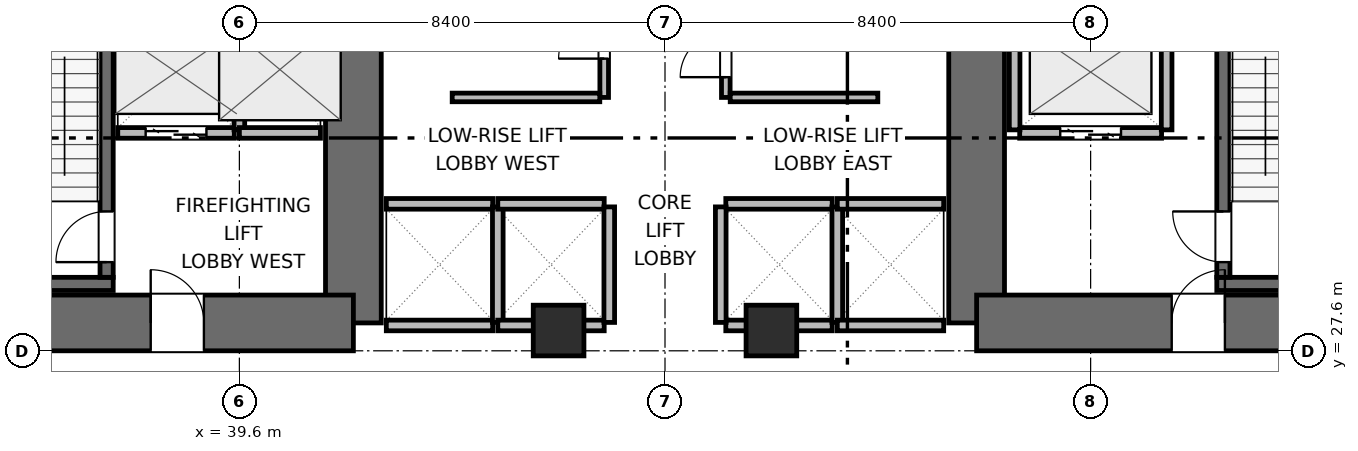
"""IFC4 building model, lengths in metres.
Left out: names, types, materials, properties, quantities, classifications, styles, units other than length and angle.
Written with IfcOpenShell. Run it as: python <this file> out.ifc"""

import sys

from ifc_helpers import new_model, si_unit, direction, frame, frame_2d, origin, origin_2d, place, context, subcontext, project, spatial, rectangle, extrude, element, fill, save


model = new_model("IFC4")
c1 = context("Model", 3, precision=1e-05, world=origin(), true_north=direction((0.0, 1.0)))
c2 = subcontext(c1, "Body", "Model", "MODEL_VIEW")
j1 = project(units=[si_unit("LENGTHUNIT", "METRE"), si_unit("PLANEANGLEUNIT", "RADIAN")], contexts=[c1])
p1 = place(None, origin())
s1 = spatial("IfcSite", under=j1, at=p1, CompositionType="ELEMENT")
p2 = place(p1, origin())
s2 = spatial("IfcBuilding", under=s1, at=p2, CompositionType="ELEMENT")
p3 = place(p2, frame((0.0, 0.0, 17.1)))
s3 = spatial("IfcBuildingStorey", under=s2, at=p3, CompositionType="ELEMENT", Elevation=17.1)
p4 = place(p3, frame((41.85, 28.15, 0.0), z_axis=(0.0, 0.0, 1.0), x_axis=(0.0, 1.0, 0.0)))
e1 = element("IfcWall", 1, at=p4, inside=s3, PredefinedType="SHEAR", context=c2, shape_type="SweptSolid", body=[
    extrude(rectangle(XDim=6.25, YDim=1.1, at=frame_2d((3.125, 0.0))), origin(), (0.0, 0.0, 1.0), 4.5),
])
p5 = place(p3, frame((32.95, 28.15, 0.0), z_axis=(0.0, 0.0, 1.0), x_axis=(1.0, 0.0, 0.0)))
e2 = element("IfcWall", 2, at=p5, inside=s3, PredefinedType="SHEAR", context=c2, shape_type="SweptSolid", body=[
    extrude(rectangle(XDim=8.9, YDim=1.1, at=frame_2d((4.45, 0.0))), origin(), (0.0, 0.0, 1.0), 4.5),
])
p6 = place(p5, frame((4.9, 0.0, 0.0)))
e3 = element("IfcOpeningElement", 3, at=p6, cuts=e2, PredefinedType="OPENING", context=c2, shape_type="SweptSolid", body=[
    extrude(rectangle(XDim=1.05, YDim=2.04, at=frame_2d((0.525, 1.02))), frame((0.0, 0.56, 0.0), z_axis=(0.0, -1.0, 0.0), x_axis=(1.0, 0.0, 0.0)), (0.0, 0.0, 1.0), 1.12),
])
p7 = place(p3, frame((54.15, 28.15, 0.0), z_axis=(0.0, 0.0, 1.0), x_axis=(0.0, 1.0, 0.0)))
e4 = element("IfcWall", 4, at=p7, inside=s3, PredefinedType="SHEAR", context=c2, shape_type="SweptSolid", body=[
    extrude(rectangle(XDim=7.65, YDim=1.1, at=frame_2d((3.825, 0.0))), origin(), (0.0, 0.0, 1.0), 4.5),
])
p8 = place(p3, frame((54.15, 28.15, 0.0), z_axis=(0.0, 0.0, 1.0), x_axis=(1.0, 0.0, 0.0)))
e5 = element("IfcWall", 5, at=p8, inside=s3, PredefinedType="SHEAR", context=c2, shape_type="SweptSolid", body=[
    extrude(rectangle(XDim=8.9, YDim=1.1, at=frame_2d((4.45, 0.0))), origin(), (0.0, 0.0, 1.0), 4.5),
])
p9 = place(p8, frame((3.85, 0.0, 0.0)))
e6 = element("IfcOpeningElement", 6, at=p9, cuts=e5, PredefinedType="OPENING", context=c2, shape_type="SweptSolid", body=[
    extrude(rectangle(XDim=1.05, YDim=2.04, at=frame_2d((0.525, 1.02))), frame((0.0, 0.56, 0.0), z_axis=(0.0, -1.0, 0.0), x_axis=(1.0, 0.0, 0.0)), (0.0, 0.0, 1.0), 1.12),
])
p10 = place(p3, frame((33.5, 28.92, 0.0), z_axis=(0.0, 0.0, 1.0), x_axis=(1.0, 0.0, 0.0)))
e7 = element("IfcWall", 7, at=p10, inside=s3, PredefinedType="SHEAR", context=c2, shape_type="SweptSolid", body=[
    extrude(rectangle(XDim=3.61, YDim=0.26, at=frame_2d((1.805, 0.0))), origin(), (0.0, 0.0, 1.0), 4.5),
])
p11 = place(p3, frame((36.98, 29.05, 0.0), z_axis=(0.0, 0.0, 1.0), x_axis=(0.0, 1.0, 0.0)))
e8 = element("IfcWall", 8, at=p11, inside=s3, PredefinedType="SHEAR", context=c2, shape_type="SweptSolid", body=[
    extrude(rectangle(XDim=7.6, YDim=0.26, at=frame_2d((3.8, 0.0))), origin(), (0.0, 0.0, 1.0), 4.5),
])
p12 = place(p11, frame((0.3, 0.0, 0.0)))
e9 = element("IfcOpeningElement", 9, at=p12, cuts=e8, PredefinedType="OPENING", context=c2, shape_type="SweptSolid", body=[
    extrude(rectangle(XDim=1.0, YDim=2.04, at=frame_2d((0.5, 1.02))), frame((0.0, 0.14, 0.0), z_axis=(0.0, -1.0, 0.0), x_axis=(1.0, 0.0, 0.0)), (0.0, 0.0, 1.0), 0.28),
])
p13 = place(p3, frame((58.89, 28.92, 0.0), z_axis=(0.0, 0.0, 1.0), x_axis=(1.0, 0.0, 0.0)))
e10 = element("IfcWall", 10, at=p13, inside=s3, PredefinedType="SHEAR", context=c2, shape_type="SweptSolid", body=[
    extrude(rectangle(XDim=3.61, YDim=0.26, at=frame_2d((1.805, 0.0))), origin(), (0.0, 0.0, 1.0), 4.5),
])
p14 = place(p3, frame((59.02, 29.05, 0.0), z_axis=(0.0, 0.0, 1.0), x_axis=(0.0, 1.0, 0.0)))
e11 = element("IfcWall", 11, at=p14, inside=s3, PredefinedType="SHEAR", context=c2, shape_type="SweptSolid", body=[
    extrude(rectangle(XDim=7.6, YDim=0.26, at=frame_2d((3.8, 0.0))), origin(), (0.0, 0.0, 1.0), 4.5),
])
p15 = place(p14, frame((0.3, 0.0, 0.0)))
e12 = element("IfcOpeningElement", 12, at=p15, cuts=e11, PredefinedType="OPENING", context=c2, shape_type="SweptSolid", body=[
    extrude(rectangle(XDim=1.0, YDim=2.04, at=frame_2d((0.5, 1.02))), frame((0.0, 0.14, 0.0), z_axis=(0.0, -1.0, 0.0), x_axis=(1.0, 0.0, 0.0)), (0.0, 0.0, 1.0), 0.28),
])
for number, where, z_axis, x_axis in (
    (13, (45.9, 28.0, 0.0), (0.0, 0.0, 1.0), (1.0, 0.0, 0.0)),
    (14, (50.1, 28.0, 0.0), (0.0, 0.0, 1.0), (1.0, 0.0, 0.0)),
):
    element("IfcColumn", number, at=place(p3, frame(where, z_axis=z_axis, x_axis=x_axis)), inside=s3, PredefinedType="COLUMN", context=c2, shape_type="SweptSolid", body=[
        extrude(rectangle(XDim=1.0, YDim=1.0, at=origin_2d()), origin(), (0.0, 0.0, 1.0), 4.5),
    ])
p16 = place(p3, frame((37.2, 31.9, 0.0), z_axis=(0.0, 0.0, 1.0), x_axis=(1.0, 0.0, 0.0)))
e15 = element("IfcWall", 15, at=p16, inside=s3, PredefinedType="PARTITIONING", context=c2, shape_type="SweptSolid", body=[
    extrude(rectangle(XDim=2.3, YDim=0.21, at=frame_2d((1.15, 0.0))), origin(), (0.0, 0.0, 1.0), 4.24),
])
p17 = place(p16, frame((0.55, 0.0, 0.0)))
e16 = element("IfcOpeningElement", 16, at=p17, cuts=e15, PredefinedType="OPENING", context=c2, shape_type="SweptSolid", body=[
    extrude(rectangle(XDim=1.2, YDim=2.04, at=frame_2d((0.6, 1.02))), frame((0.0, 0.115, 0.0), z_axis=(0.0, -1.0, 0.0), x_axis=(1.0, 0.0, 0.0)), (0.0, 0.0, 1.0), 0.23),
])
p18 = place(p3, frame((39.6, 31.96, 0.0), z_axis=(0.0, 0.0, 1.0), x_axis=(0.0, 1.0, 0.0)))
e17 = element("IfcWall", 17, at=p18, inside=s3, PredefinedType="PARTITIONING", context=c2, shape_type="SweptSolid", body=[
    extrude(rectangle(XDim=2.28, YDim=0.21, at=frame_2d((1.14, 0.0))), origin(), (0.0, 0.0, 1.0), 4.24),
])
p19 = place(p3, frame((55.0, 31.9, 0.0), z_axis=(0.0, 0.0, 1.0), x_axis=(1.0, 0.0, 0.0)))
e18 = element("IfcWall", 18, at=p19, inside=s3, PredefinedType="PARTITIONING", context=c2, shape_type="SweptSolid", body=[
    extrude(rectangle(XDim=2.8, YDim=0.21, at=frame_2d((1.4, 0.0))), origin(), (0.0, 0.0, 1.0), 4.24),
])
p20 = place(p19, frame((0.8, 0.0, 0.0)))
e19 = element("IfcOpeningElement", 19, at=p20, cuts=e18, PredefinedType="OPENING", context=c2, shape_type="SweptSolid", body=[
    extrude(rectangle(XDim=1.2, YDim=2.04, at=frame_2d((0.6, 1.02))), frame((0.0, 0.115, 0.0), z_axis=(0.0, -1.0, 0.0), x_axis=(1.0, 0.0, 0.0)), (0.0, 0.0, 1.0), 0.23),
])
for number, where, z_axis, x_axis in (
    (20, (54.9, 31.96, 0.0), (0.0, 0.0, 1.0), (0.0, 1.0, 0.0)),
    (21, (57.9, 31.96, 0.0), (0.0, 0.0, 1.0), (0.0, 1.0, 0.0)),
):
    element("IfcWall", number, at=place(p3, frame(where, z_axis=z_axis, x_axis=x_axis)), inside=s3, PredefinedType="PARTITIONING", context=c2, shape_type="SweptSolid", body=[
        extrude(rectangle(XDim=2.28, YDim=0.21, at=frame_2d((1.14, 0.0))), origin(), (0.0, 0.0, 1.0), 4.24),
    ])
p21 = place(p3, frame((39.6, 31.9, 0.0), z_axis=(0.0, 0.0, 1.0), x_axis=(1.0, 0.0, 0.0)))
e22 = element("IfcWall", 22, at=p21, inside=s3, PredefinedType="PARTITIONING", context=c2, shape_type="SweptSolid", body=[
    extrude(rectangle(XDim=1.6, YDim=0.21, at=frame_2d((0.8, 0.0))), origin(), (0.0, 0.0, 1.0), 4.24),
])
p22 = place(p3, frame((42.5, 30.5, 0.0), z_axis=(0.0, 0.0, 1.0), x_axis=(1.0, 0.0, 0.0)))
e23 = element("IfcWall", 23, at=p22, inside=s3, PredefinedType="PARTITIONING", context=c2, shape_type="SweptSolid", body=[
    extrude(rectangle(XDim=2.1, YDim=0.21, at=frame_2d((1.05, 0.0))), origin(), (0.0, 0.0, 1.0), 4.24),
])
p23 = place(p3, frame((42.5, 28.1, 0.0), z_axis=(0.0, 0.0, 1.0), x_axis=(1.0, 0.0, 0.0)))
e24 = element("IfcWall", 24, at=p23, inside=s3, PredefinedType="PARTITIONING", context=c2, shape_type="SweptSolid", body=[
    extrude(rectangle(XDim=2.1, YDim=0.21, at=frame_2d((1.05, 0.0))), origin(), (0.0, 0.0, 1.0), 3.125),
])
p24 = place(p3, frame((44.7, 28.16, 0.0), z_axis=(0.0, 0.0, 1.0), x_axis=(0.0, 1.0, 0.0)))
e25 = element("IfcWall", 25, at=p24, inside=s3, PredefinedType="PARTITIONING", context=c2, shape_type="SweptSolid", body=[
    extrude(rectangle(XDim=2.28, YDim=0.21, at=frame_2d((1.14, 0.0))), origin(), (0.0, 0.0, 1.0), 4.24),
])
p25 = place(p3, frame((44.7, 30.5, 0.0), z_axis=(0.0, 0.0, 1.0), x_axis=(1.0, 0.0, 0.0)))
e26 = element("IfcWall", 26, at=p25, inside=s3, PredefinedType="PARTITIONING", context=c2, shape_type="SweptSolid", body=[
    extrude(rectangle(XDim=2.1, YDim=0.21, at=frame_2d((1.05, 0.0))), origin(), (0.0, 0.0, 1.0), 4.24),
])
p26 = place(p3, frame((44.7, 28.1, 0.0), z_axis=(0.0, 0.0, 1.0), x_axis=(1.0, 0.0, 0.0)))
e27 = element("IfcWall", 27, at=p26, inside=s3, PredefinedType="PARTITIONING", context=c2, shape_type="SweptSolid", body=[
    extrude(rectangle(XDim=2.1, YDim=0.21, at=frame_2d((1.05, 0.0))), origin(), (0.0, 0.0, 1.0), 3.125),
])
p27 = place(p3, frame((46.9, 28.16, 0.0), z_axis=(0.0, 0.0, 1.0), x_axis=(0.0, 1.0, 0.0)))
e28 = element("IfcWall", 28, at=p27, inside=s3, PredefinedType="PARTITIONING", context=c2, shape_type="SweptSolid", body=[
    extrude(rectangle(XDim=2.28, YDim=0.21, at=frame_2d((1.14, 0.0))), origin(), (0.0, 0.0, 1.0), 4.24),
])
p28 = place(p3, frame((49.2, 30.5, 0.0), z_axis=(0.0, 0.0, 1.0), x_axis=(1.0, 0.0, 0.0)))
e29 = element("IfcWall", 29, at=p28, inside=s3, PredefinedType="PARTITIONING", context=c2, shape_type="SweptSolid", body=[
    extrude(rectangle(XDim=2.1, YDim=0.21, at=frame_2d((1.05, 0.0))), origin(), (0.0, 0.0, 1.0), 4.24),
])
p29 = place(p3, frame((49.2, 28.1, 0.0), z_axis=(0.0, 0.0, 1.0), x_axis=(1.0, 0.0, 0.0)))
e30 = element("IfcWall", 30, at=p29, inside=s3, PredefinedType="PARTITIONING", context=c2, shape_type="SweptSolid", body=[
    extrude(rectangle(XDim=2.1, YDim=0.21, at=frame_2d((1.05, 0.0))), origin(), (0.0, 0.0, 1.0), 3.125),
])
for number, where, z_axis, x_axis in (
    (31, (49.1, 28.16, 0.0), (0.0, 0.0, 1.0), (0.0, 1.0, 0.0)),
    (32, (51.4, 28.16, 0.0), (0.0, 0.0, 1.0), (0.0, 1.0, 0.0)),
):
    element("IfcWall", number, at=place(p3, frame(where, z_axis=z_axis, x_axis=x_axis)), inside=s3, PredefinedType="PARTITIONING", context=c2, shape_type="SweptSolid", body=[
        extrude(rectangle(XDim=2.28, YDim=0.21, at=frame_2d((1.14, 0.0))), origin(), (0.0, 0.0, 1.0), 4.24),
    ])
p30 = place(p3, frame((51.4, 30.5, 0.0), z_axis=(0.0, 0.0, 1.0), x_axis=(1.0, 0.0, 0.0)))
e33 = element("IfcWall", 33, at=p30, inside=s3, PredefinedType="PARTITIONING", context=c2, shape_type="SweptSolid", body=[
    extrude(rectangle(XDim=2.1, YDim=0.21, at=frame_2d((1.05, 0.0))), origin(), (0.0, 0.0, 1.0), 4.24),
])
p31 = place(p3, frame((51.4, 28.1, 0.0), z_axis=(0.0, 0.0, 1.0), x_axis=(1.0, 0.0, 0.0)))
e34 = element("IfcWall", 34, at=p31, inside=s3, PredefinedType="PARTITIONING", context=c2, shape_type="SweptSolid", body=[
    extrude(rectangle(XDim=2.1, YDim=0.21, at=frame_2d((1.05, 0.0))), origin(), (0.0, 0.0, 1.0), 3.125),
])
p32 = place(p3, frame((46.8, 32.6, 0.0), z_axis=(0.0, 0.0, 1.0), x_axis=(0.0, 1.0, 0.0)))
e35 = element("IfcWall", 35, at=p32, inside=s3, PredefinedType="PARTITIONING", context=c2, shape_type="SweptSolid", body=[
    extrude(rectangle(XDim=3.8, YDim=0.17, at=frame_2d((1.9, 0.0))), origin(), (0.0, 0.0, 1.0), 4.24),
])
p33 = place(p32, frame((0.766, 0.0, 0.0)))
e36 = element("IfcOpeningElement", 36, at=p33, cuts=e35, PredefinedType="OPENING", context=c2, shape_type="SweptSolid", body=[
    extrude(rectangle(XDim=0.9, YDim=2.02, at=frame_2d((0.45, 1.01))), frame((0.0, 0.095, 0.0), z_axis=(0.0, -1.0, 0.0), x_axis=(1.0, 0.0, 0.0)), (0.0, 0.0, 1.0), 0.19),
])
p34 = place(p32, frame((2.666, 0.0, 0.0)))
e37 = element("IfcOpeningElement", 37, at=p34, cuts=e35, PredefinedType="OPENING", context=c2, shape_type="SweptSolid", body=[
    extrude(rectangle(XDim=0.9, YDim=2.02, at=frame_2d((0.45, 1.01))), frame((0.0, 0.095, 0.0), z_axis=(0.0, -1.0, 0.0), x_axis=(1.0, 0.0, 0.0)), (0.0, 0.0, 1.0), 0.19),
])
p35 = place(p3, frame((43.8, 32.6, 0.0), z_axis=(0.0, 0.0, 1.0), x_axis=(1.0, 0.0, 0.0)))
e38 = element("IfcWall", 38, at=p35, inside=s3, PredefinedType="PARTITIONING", context=c2, shape_type="SweptSolid", body=[
    extrude(rectangle(XDim=2.913, YDim=0.17, at=frame_2d((1.457, 0.0))), origin(), (0.0, 0.0, 1.0), 4.24),
])
p36 = place(p3, frame((49.2, 32.6, 0.0), z_axis=(0.0, 0.0, 1.0), x_axis=(0.0, 1.0, 0.0)))
e39 = element("IfcWall", 39, at=p36, inside=s3, PredefinedType="PARTITIONING", context=c2, shape_type="SweptSolid", body=[
    extrude(rectangle(XDim=3.4, YDim=0.17, at=frame_2d((1.7, 0.0))), origin(), (0.0, 0.0, 1.0), 4.24),
])
p37 = place(p36, frame((0.4, 0.0, 0.0)))
e40 = element("IfcOpeningElement", 40, at=p37, cuts=e39, PredefinedType="OPENING", context=c2, shape_type="SweptSolid", body=[
    extrude(rectangle(XDim=0.9, YDim=2.02, at=frame_2d((0.45, 1.01))), frame((0.0, 0.095, 0.0), z_axis=(0.0, -1.0, 0.0), x_axis=(1.0, 0.0, 0.0)), (0.0, 0.0, 1.0), 0.19),
])
p38 = place(p36, frame((2.1, 0.0, 0.0)))
e41 = element("IfcOpeningElement", 41, at=p38, cuts=e39, PredefinedType="OPENING", context=c2, shape_type="SweptSolid", body=[
    extrude(rectangle(XDim=0.9, YDim=2.02, at=frame_2d((0.45, 1.01))), frame((0.0, 0.095, 0.0), z_axis=(0.0, -1.0, 0.0), x_axis=(1.0, 0.0, 0.0)), (0.0, 0.0, 1.0), 0.19),
])
p39 = place(p3, frame((49.287, 32.6, 0.0), z_axis=(0.0, 0.0, 1.0), x_axis=(1.0, 0.0, 0.0)))
e42 = element("IfcWall", 42, at=p39, inside=s3, PredefinedType="PARTITIONING", context=c2, shape_type="SweptSolid", body=[
    extrude(rectangle(XDim=2.913, YDim=0.17, at=frame_2d((1.457, 0.0))), origin(), (0.0, 0.0, 1.0), 4.24),
])
p40 = place(p12, origin())
e43 = element("IfcDoor", 43, at=p40, inside=s3, OperationType="SINGLE_SWING_LEFT", PredefinedType="DOOR", context=c2, shape_type="SweptSolid", body=[
    extrude(rectangle(XDim=1.0, YDim=2.04, at=frame_2d((0.5, 1.02))), frame((0.0, 0.025, 0.0), z_axis=(0.0, -1.0, 0.0), x_axis=(1.0, 0.0, 0.0)), (0.0, 0.0, 1.0), 0.05),
])
fill(e9, e43)
p41 = place(p15, origin())
e44 = element("IfcDoor", 44, at=p41, inside=s3, OperationType="SINGLE_SWING_RIGHT", PredefinedType="DOOR", context=c2, shape_type="SweptSolid", body=[
    extrude(rectangle(XDim=1.0, YDim=2.04, at=frame_2d((0.5, 1.02))), frame((0.0, 0.025, 0.0), z_axis=(0.0, -1.0, 0.0), x_axis=(1.0, 0.0, 0.0)), (0.0, 0.0, 1.0), 0.05),
])
fill(e12, e44)
p42 = place(p17, origin())
e45 = element("IfcDoor", 45, at=p42, inside=s3, OperationType="DOUBLE_DOOR_SLIDING", PredefinedType="DOOR", context=c2, shape_type="SweptSolid", body=[
    extrude(rectangle(XDim=1.2, YDim=2.04, at=frame_2d((0.6, 1.02))), frame((0.0, 0.025, 0.0), z_axis=(0.0, -1.0, 0.0), x_axis=(1.0, 0.0, 0.0)), (0.0, 0.0, 1.0), 0.05),
])
fill(e16, e45)
p43 = place(p20, origin())
e46 = element("IfcDoor", 46, at=p43, inside=s3, OperationType="DOUBLE_DOOR_SLIDING", PredefinedType="DOOR", context=c2, shape_type="SweptSolid", body=[
    extrude(rectangle(XDim=1.2, YDim=2.04, at=frame_2d((0.6, 1.02))), frame((0.0, 0.025, 0.0), z_axis=(0.0, -1.0, 0.0), x_axis=(1.0, 0.0, 0.0)), (0.0, 0.0, 1.0), 0.05),
])
fill(e19, e46)
p44 = place(p6, origin())
e47 = element("IfcDoor", 47, at=p44, inside=s3, OperationType="SINGLE_SWING_LEFT", PredefinedType="DOOR", context=c2, shape_type="SweptSolid", body=[
    extrude(rectangle(XDim=1.05, YDim=2.04, at=frame_2d((0.525, 1.02))), frame((0.0, 0.025, 0.0), z_axis=(0.0, -1.0, 0.0), x_axis=(1.0, 0.0, 0.0)), (0.0, 0.0, 1.0), 0.05),
])
fill(e3, e47)
p45 = place(p9, origin())
e48 = element("IfcDoor", 48, at=p45, inside=s3, OperationType="SINGLE_SWING_RIGHT", PredefinedType="DOOR", context=c2, shape_type="SweptSolid", body=[
    extrude(rectangle(XDim=1.05, YDim=2.04, at=frame_2d((0.525, 1.02))), frame((0.0, 0.025, 0.0), z_axis=(0.0, -1.0, 0.0), x_axis=(1.0, 0.0, 0.0)), (0.0, 0.0, 1.0), 0.05),
])
fill(e6, e48)
p46 = place(p33, origin())
e49 = element("IfcDoor", 49, at=p46, inside=s3, OperationType="SINGLE_SWING_LEFT", PredefinedType="DOOR", context=c2, shape_type="SweptSolid", body=[
    extrude(rectangle(XDim=0.9, YDim=2.02, at=frame_2d((0.45, 1.01))), frame((0.0, 0.025, 0.0), z_axis=(0.0, -1.0, 0.0), x_axis=(1.0, 0.0, 0.0)), (0.0, 0.0, 1.0), 0.05),
])
fill(e36, e49)
p47 = place(p37, origin())
e50 = element("IfcDoor", 50, at=p47, inside=s3, OperationType="SINGLE_SWING_LEFT", PredefinedType="DOOR", context=c2, shape_type="SweptSolid", body=[
    extrude(rectangle(XDim=0.9, YDim=2.02, at=frame_2d((0.45, 1.01))), frame((0.0, 0.025, 0.0), z_axis=(0.0, -1.0, 0.0), x_axis=(1.0, 0.0, 0.0)), (0.0, 0.0, 1.0), 0.05),
])
fill(e40, e50)
save(model, sys.argv[1])
